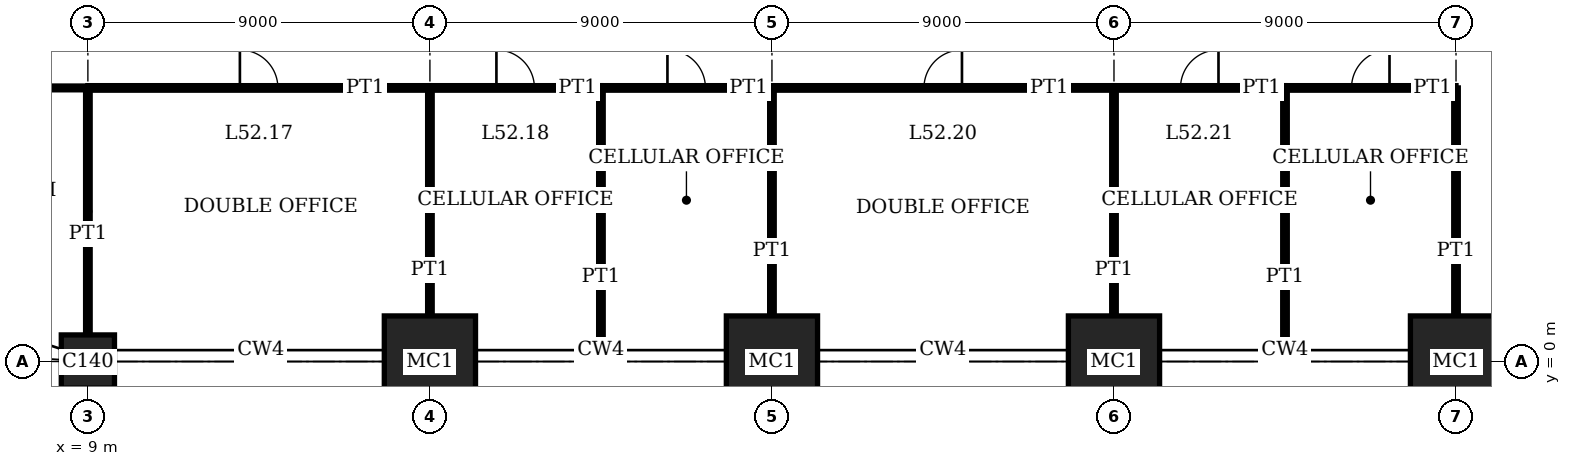
"""IFC4 building model, lengths in metres.
Left out: names, types, materials, properties, quantities, classifications, styles, units other than length and angle.
Written with IfcOpenShell. Run it as: python <this file> out.ifc"""

import sys

from ifc_helpers import new_model, si_unit, direction, frame, frame_2d, origin, origin_2d, place, context, subcontext, project, spatial, rectangle, extrude, element, fill, save


model = new_model("IFC4")
c1 = context("Model", 3, precision=1e-05, world=origin(), true_north=direction((0.0, 1.0)))
c2 = subcontext(c1, "Body", "Model", "MODEL_VIEW")
j1 = project(units=[si_unit("LENGTHUNIT", "METRE"), si_unit("PLANEANGLEUNIT", "RADIAN")], contexts=[c1])
p1 = place(None, origin())
s1 = spatial("IfcSite", under=j1, at=p1, CompositionType="ELEMENT")
p2 = place(p1, origin())
s2 = spatial("IfcBuilding", under=s1, at=p2, CompositionType="ELEMENT")
p3 = place(p2, frame((0.0, 0.0, 214.2)))
s3 = spatial("IfcBuildingStorey", under=s2, at=p3, CompositionType="ELEMENT", Elevation=214.2)
p4 = place(p3, frame((9.0, 0.0, 0.0), z_axis=(0.0, 0.0, 1.0), x_axis=(1.0, 0.0, 0.0)))
e1 = element("IfcColumn", 1, at=p4, inside=s3, PredefinedType="COLUMN", context=c2, shape_type="SweptSolid", body=[
    extrude(rectangle(XDim=1.4, YDim=1.4, at=origin_2d()), origin(), (0.0, 0.0, 1.0), 4.0),
])
for number, where, z_axis, x_axis in (
    (2, (18.0, 0.0, 0.0), (0.0, 0.0, 1.0), (1.0, 0.0, 0.0)),
    (3, (27.0, 0.0, 0.0), (0.0, 0.0, 1.0), (1.0, 0.0, 0.0)),
    (4, (36.0, 0.0, 0.0), (0.0, 0.0, 1.0), (1.0, 0.0, 0.0)),
    (5, (45.0, 0.0, 0.0), (0.0, 0.0, 1.0), (1.0, 0.0, 0.0)),
):
    element("IfcColumn", number, at=place(p3, frame(where, z_axis=z_axis, x_axis=x_axis)), inside=s3, PredefinedType="COLUMN", context=c2, shape_type="SweptSolid", body=[
        extrude(rectangle(XDim=2.4, YDim=2.4, at=origin_2d()), origin(), (0.0, 0.0, 1.0), 4.0),
    ])
p5 = place(p3, frame((9.0, 7.2, 0.0), z_axis=(0.0, 0.0, 1.0), x_axis=(1.0, 0.0, 0.0)))
e6 = element("IfcWall", 6, at=p5, inside=s3, PredefinedType="PARTITIONING", context=c2, shape_type="SweptSolid", body=[
    extrude(rectangle(XDim=9.0, YDim=0.12, at=frame_2d((4.5, 0.0))), origin(), (0.0, 0.0, 1.0), 3.75),
])
p6 = place(p5, frame((4.0, 0.0, 0.0)))
e7 = element("IfcOpeningElement", 7, at=p6, cuts=e6, PredefinedType="OPENING", context=c2, shape_type="SweptSolid", body=[
    extrude(rectangle(XDim=1.0, YDim=2.4, at=frame_2d((0.5, 1.2))), frame((0.0, 0.07, 0.0), z_axis=(0.0, -1.0, 0.0), x_axis=(1.0, 0.0, 0.0)), (0.0, 0.0, 1.0), 0.14),
])
p7 = place(p3, frame((18.0, 7.2, 0.0), z_axis=(0.0, 0.0, 1.0), x_axis=(1.0, 0.0, 0.0)))
e8 = element("IfcWall", 8, at=p7, inside=s3, PredefinedType="PARTITIONING", context=c2, shape_type="SweptSolid", body=[
    extrude(rectangle(XDim=4.5, YDim=0.12, at=frame_2d((2.25, 0.0))), origin(), (0.0, 0.0, 1.0), 3.75),
])
p8 = place(p7, frame((1.75, 0.0, 0.0)))
e9 = element("IfcOpeningElement", 9, at=p8, cuts=e8, PredefinedType="OPENING", context=c2, shape_type="SweptSolid", body=[
    extrude(rectangle(XDim=1.0, YDim=2.4, at=frame_2d((0.5, 1.2))), frame((0.0, 0.07, 0.0), z_axis=(0.0, -1.0, 0.0), x_axis=(1.0, 0.0, 0.0)), (0.0, 0.0, 1.0), 0.14),
])
p9 = place(p3, frame((22.5, 7.2, 0.0), z_axis=(0.0, 0.0, 1.0), x_axis=(1.0, 0.0, 0.0)))
e10 = element("IfcWall", 10, at=p9, inside=s3, PredefinedType="PARTITIONING", context=c2, shape_type="SweptSolid", body=[
    extrude(rectangle(XDim=4.5, YDim=0.12, at=frame_2d((2.25, 0.0))), origin(), (0.0, 0.0, 1.0), 3.75),
])
p10 = place(p9, frame((1.75, 0.0, 0.0)))
e11 = element("IfcOpeningElement", 11, at=p10, cuts=e10, PredefinedType="OPENING", context=c2, shape_type="SweptSolid", body=[
    extrude(rectangle(XDim=1.0, YDim=2.4, at=frame_2d((0.5, 1.2))), frame((0.0, 0.07, 0.0), z_axis=(0.0, -1.0, 0.0), x_axis=(1.0, 0.0, 0.0)), (0.0, 0.0, 1.0), 0.14),
])
p11 = place(p3, frame((27.0, 7.2, 0.0), z_axis=(0.0, 0.0, 1.0), x_axis=(1.0, 0.0, 0.0)))
e12 = element("IfcWall", 12, at=p11, inside=s3, PredefinedType="PARTITIONING", context=c2, shape_type="SweptSolid", body=[
    extrude(rectangle(XDim=9.0, YDim=0.12, at=frame_2d((4.5, 0.0))), origin(), (0.0, 0.0, 1.0), 3.75),
])
p12 = place(p11, frame((4.0, 0.0, 0.0)))
e13 = element("IfcOpeningElement", 13, at=p12, cuts=e12, PredefinedType="OPENING", context=c2, shape_type="SweptSolid", body=[
    extrude(rectangle(XDim=1.0, YDim=2.4, at=frame_2d((0.5, 1.2))), frame((0.0, 0.07, 0.0), z_axis=(0.0, -1.0, 0.0), x_axis=(1.0, 0.0, 0.0)), (0.0, 0.0, 1.0), 0.14),
])
p13 = place(p3, frame((36.0, 7.2, 0.0), z_axis=(0.0, 0.0, 1.0), x_axis=(1.0, 0.0, 0.0)))
e14 = element("IfcWall", 14, at=p13, inside=s3, PredefinedType="PARTITIONING", context=c2, shape_type="SweptSolid", body=[
    extrude(rectangle(XDim=4.5, YDim=0.12, at=frame_2d((2.25, 0.0))), origin(), (0.0, 0.0, 1.0), 3.75),
])
p14 = place(p13, frame((1.75, 0.0, 0.0)))
e15 = element("IfcOpeningElement", 15, at=p14, cuts=e14, PredefinedType="OPENING", context=c2, shape_type="SweptSolid", body=[
    extrude(rectangle(XDim=1.0, YDim=2.4, at=frame_2d((0.5, 1.2))), frame((0.0, 0.07, 0.0), z_axis=(0.0, -1.0, 0.0), x_axis=(1.0, 0.0, 0.0)), (0.0, 0.0, 1.0), 0.14),
])
p15 = place(p3, frame((40.5, 7.2, 0.0), z_axis=(0.0, 0.0, 1.0), x_axis=(1.0, 0.0, 0.0)))
e16 = element("IfcWall", 16, at=p15, inside=s3, PredefinedType="PARTITIONING", context=c2, shape_type="SweptSolid", body=[
    extrude(rectangle(XDim=4.5, YDim=0.12, at=frame_2d((2.25, 0.0))), origin(), (0.0, 0.0, 1.0), 3.75),
])
p16 = place(p15, frame((1.75, 0.0, 0.0)))
e17 = element("IfcOpeningElement", 17, at=p16, cuts=e16, PredefinedType="OPENING", context=c2, shape_type="SweptSolid", body=[
    extrude(rectangle(XDim=1.0, YDim=2.4, at=frame_2d((0.5, 1.2))), frame((0.0, 0.07, 0.0), z_axis=(0.0, -1.0, 0.0), x_axis=(1.0, 0.0, 0.0)), (0.0, 0.0, 1.0), 0.14),
])
p17 = place(p3, frame((0.72, 7.2, 0.0), z_axis=(0.0, 0.0, 1.0), x_axis=(1.0, 0.0, 0.0)))
e18 = element("IfcWall", 18, at=p17, inside=s3, PredefinedType="PARTITIONING", context=c2, shape_type="SweptSolid", body=[
    extrude(rectangle(XDim=8.28, YDim=0.1, at=frame_2d((4.14, 0.0))), origin(), (0.0, 0.0, 1.0), 3.75),
])
p18 = place(p17, frame((2.78, 0.0, 0.0)))
e19 = element("IfcOpeningElement", 19, at=p18, cuts=e18, PredefinedType="OPENING", context=c2, shape_type="SweptSolid", body=[
    extrude(rectangle(XDim=1.0, YDim=2.4, at=frame_2d((0.5, 1.2))), frame((0.0, 0.06, 0.0), z_axis=(0.0, -1.0, 0.0), x_axis=(1.0, 0.0, 0.0)), (0.0, 0.0, 1.0), 0.12),
])
p19 = place(p3, frame((9.0, 0.7, 0.0), z_axis=(0.0, 0.0, 1.0), x_axis=(0.0, 1.0, 0.0)))
e20 = element("IfcWall", 20, at=p19, inside=s3, PredefinedType="PARTITIONING", context=c2, shape_type="SweptSolid", body=[
    extrude(rectangle(XDim=6.5, YDim=0.12, at=frame_2d((3.25, 0.0))), origin(), (0.0, 0.0, 1.0), 3.05),
])
p20 = place(p3, frame((18.0, 1.2, 0.0), z_axis=(0.0, 0.0, 1.0), x_axis=(0.0, 1.0, 0.0)))
e21 = element("IfcWall", 21, at=p20, inside=s3, PredefinedType="PARTITIONING", context=c2, shape_type="SweptSolid", body=[
    extrude(rectangle(XDim=6.0, YDim=0.12, at=frame_2d((3.0, 0.0))), origin(), (0.0, 0.0, 1.0), 3.05),
])
p21 = place(p3, frame((22.5, 0.31, 0.0), z_axis=(0.0, 0.0, 1.0), x_axis=(0.0, 1.0, 0.0)))
e22 = element("IfcWall", 22, at=p21, inside=s3, PredefinedType="PARTITIONING", context=c2, shape_type="SweptSolid", body=[
    extrude(rectangle(XDim=6.89, YDim=0.12, at=frame_2d((3.445, 0.0))), origin(), (0.0, 0.0, 1.0), 3.75),
])
for number, where, z_axis, x_axis in (
    (23, (27.0, 1.2, 0.0), (0.0, 0.0, 1.0), (0.0, 1.0, 0.0)),
    (24, (36.0, 1.2, 0.0), (0.0, 0.0, 1.0), (0.0, 1.0, 0.0)),
):
    element("IfcWall", number, at=place(p3, frame(where, z_axis=z_axis, x_axis=x_axis)), inside=s3, PredefinedType="PARTITIONING", context=c2, shape_type="SweptSolid", body=[
        extrude(rectangle(XDim=6.0, YDim=0.12, at=frame_2d((3.0, 0.0))), origin(), (0.0, 0.0, 1.0), 3.05),
    ])
p22 = place(p3, frame((40.5, 0.31, 0.0), z_axis=(0.0, 0.0, 1.0), x_axis=(0.0, 1.0, 0.0)))
e25 = element("IfcWall", 25, at=p22, inside=s3, PredefinedType="PARTITIONING", context=c2, shape_type="SweptSolid", body=[
    extrude(rectangle(XDim=6.89, YDim=0.12, at=frame_2d((3.445, 0.0))), origin(), (0.0, 0.0, 1.0), 3.75),
])
p23 = place(p3, frame((45.0, 1.2, 0.0), z_axis=(0.0, 0.0, 1.0), x_axis=(0.0, 1.0, 0.0)))
e26 = element("IfcWall", 26, at=p23, inside=s3, PredefinedType="PARTITIONING", context=c2, shape_type="SweptSolid", body=[
    extrude(rectangle(XDim=6.0, YDim=0.12, at=frame_2d((3.0, 0.0))), origin(), (0.0, 0.0, 1.0), 3.05),
])
p24 = place(p6, origin())
e27 = element("IfcDoor", 27, at=p24, inside=s3, OperationType="SINGLE_SWING_RIGHT", PredefinedType="DOOR", context=c2, shape_type="SweptSolid", body=[
    extrude(rectangle(XDim=1.0, YDim=2.4, at=frame_2d((0.5, 1.2))), frame((0.0, 0.025, 0.0), z_axis=(0.0, -1.0, 0.0), x_axis=(1.0, 0.0, 0.0)), (0.0, 0.0, 1.0), 0.05),
])
fill(e7, e27)
p25 = place(p8, origin())
e28 = element("IfcDoor", 28, at=p25, inside=s3, OperationType="SINGLE_SWING_RIGHT", PredefinedType="DOOR", context=c2, shape_type="SweptSolid", body=[
    extrude(rectangle(XDim=1.0, YDim=2.4, at=frame_2d((0.5, 1.2))), frame((0.0, 0.025, 0.0), z_axis=(0.0, -1.0, 0.0), x_axis=(1.0, 0.0, 0.0)), (0.0, 0.0, 1.0), 0.05),
])
fill(e9, e28)
p26 = place(p10, origin())
e29 = element("IfcDoor", 29, at=p26, inside=s3, OperationType="SINGLE_SWING_RIGHT", PredefinedType="DOOR", context=c2, shape_type="SweptSolid", body=[
    extrude(rectangle(XDim=1.0, YDim=2.4, at=frame_2d((0.5, 1.2))), frame((0.0, 0.025, 0.0), z_axis=(0.0, -1.0, 0.0), x_axis=(1.0, 0.0, 0.0)), (0.0, 0.0, 1.0), 0.05),
])
fill(e11, e29)
p27 = place(p12, origin())
e30 = element("IfcDoor", 30, at=p27, inside=s3, OperationType="SINGLE_SWING_LEFT", PredefinedType="DOOR", context=c2, shape_type="SweptSolid", body=[
    extrude(rectangle(XDim=1.0, YDim=2.4, at=frame_2d((0.5, 1.2))), frame((0.0, 0.025, 0.0), z_axis=(0.0, -1.0, 0.0), x_axis=(1.0, 0.0, 0.0)), (0.0, 0.0, 1.0), 0.05),
])
fill(e13, e30)
p28 = place(p14, origin())
e31 = element("IfcDoor", 31, at=p28, inside=s3, OperationType="SINGLE_SWING_LEFT", PredefinedType="DOOR", context=c2, shape_type="SweptSolid", body=[
    extrude(rectangle(XDim=1.0, YDim=2.4, at=frame_2d((0.5, 1.2))), frame((0.0, 0.025, 0.0), z_axis=(0.0, -1.0, 0.0), x_axis=(1.0, 0.0, 0.0)), (0.0, 0.0, 1.0), 0.05),
])
fill(e15, e31)
p29 = place(p16, origin())
e32 = element("IfcDoor", 32, at=p29, inside=s3, OperationType="SINGLE_SWING_LEFT", PredefinedType="DOOR", context=c2, shape_type="SweptSolid", body=[
    extrude(rectangle(XDim=1.0, YDim=2.4, at=frame_2d((0.5, 1.2))), frame((0.0, 0.025, 0.0), z_axis=(0.0, -1.0, 0.0), x_axis=(1.0, 0.0, 0.0)), (0.0, 0.0, 1.0), 0.05),
])
fill(e17, e32)
save(model, sys.argv[1])
